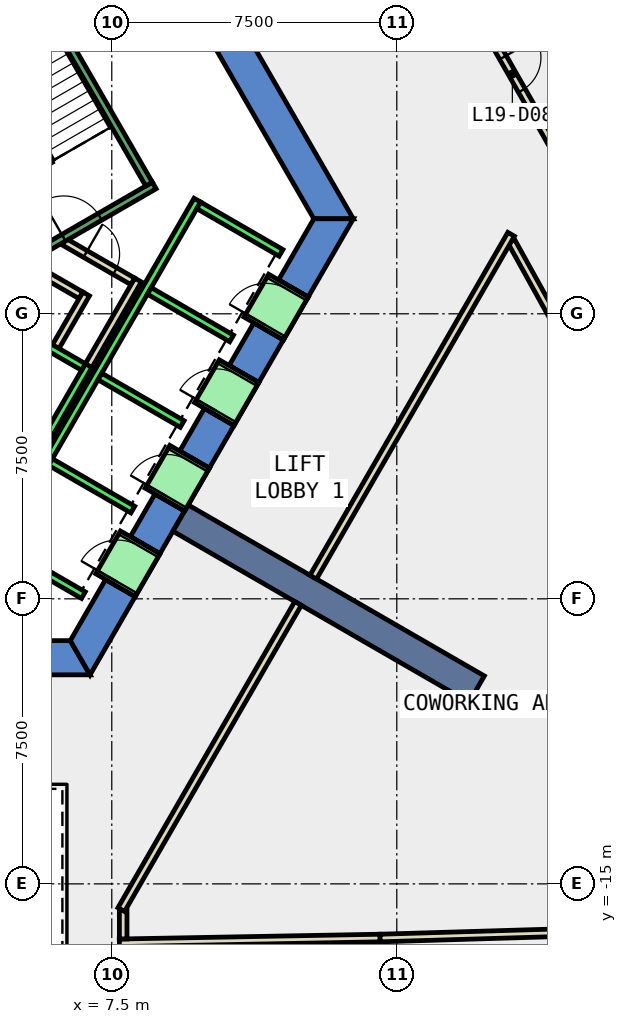
"""IFC4 building model, lengths in metres.
Left out: names, types, materials, properties, quantities, classifications, styles, units other than length and angle.
Written with IfcOpenShell. Run it as: python <this file> out.ifc"""

import sys

from ifc_helpers import new_model, si_unit, direction, frame, frame_2d, origin, place, context, subcontext, project, spatial, polyline, rectangle, outline, extrude, element, fill, save


model = new_model("IFC4")
c1 = context("Model", 3, precision=1e-05, world=origin(), true_north=direction((0.0, 1.0)))
c2 = subcontext(c1, "Body", "Model", "MODEL_VIEW")
j1 = project(units=[si_unit("LENGTHUNIT", "METRE"), si_unit("PLANEANGLEUNIT", "RADIAN")], contexts=[c1])
p1 = place(None, origin())
s1 = spatial("IfcSite", under=j1, at=p1, CompositionType="ELEMENT")
p2 = place(p1, origin())
s2 = spatial("IfcBuilding", under=s1, at=p2, CompositionType="ELEMENT")
p3 = place(p2, frame((0.0, 0.0, 90.8)))
s3 = spatial("IfcBuildingStorey", under=s2, at=p3, CompositionType="ELEMENT", Elevation=90.8)
p4 = place(p3, frame((0.0, 0.0, -0.4)))
e1 = element("IfcWall", 1, at=p4, inside=s3, PredefinedType="SHEAR", context=c2, shape_type="SweptSolid", body=[
    extrude(outline(polyline([(8.517, 11.748), (7.738, 11.298), (12.817, 2.5), (13.856, 2.5), (8.517, 11.748)])), origin(), (0.0, 0.0, 1.0), 4.2),
])
p5 = place(p3, frame((0.0, 0.0, -0.4)))
e2 = element("IfcWall", 2, at=p5, inside=s3, PredefinedType="SHEAR", context=c2, shape_type="SweptSolid", body=[
    extrude(outline(polyline([(5.75, -8.6), (5.75, -9.5), (6.928, -9.5), (6.409, -8.6), (5.75, -8.6)])), origin(), (0.0, 0.0, 1.0), 4.2),
])
p6 = place(p3, frame((0.0, 0.0, -0.4)))
e3 = element("IfcWall", 3, at=p6, inside=s3, PredefinedType="SHEAR", context=c2, shape_type="SweptSolid", body=[
    extrude(outline(polyline([(8.117, -7.44), (7.338, -6.99), (6.409, -8.6), (6.928, -9.5), (8.117, -7.44)])), origin(), (0.0, 0.0, 1.0), 4.2),
])
p7 = place(p3, frame((0.0, 0.0, -0.4)))
e4 = element("IfcWall", 4, at=p7, inside=s3, PredefinedType="SHEAR", context=c2, shape_type="SweptSolid", body=[
    extrude(outline(polyline([(9.417, -5.189), (8.638, -4.739), (7.988, -5.864), (8.767, -6.314), (9.417, -5.189)])), origin(), (0.0, 0.0, 1.0), 4.2),
])
p8 = place(p3, frame((0.0, 0.0, -0.4)))
e5 = element("IfcWall", 5, at=p8, inside=s3, PredefinedType="SHEAR", context=c2, shape_type="SweptSolid", body=[
    extrude(outline(polyline([(10.717, -2.937), (9.938, -2.487), (9.288, -3.613), (10.067, -4.063), (10.717, -2.937)])), origin(), (0.0, 0.0, 1.0), 4.2),
])
p9 = place(p3, frame((0.0, 0.0, -0.4)))
e6 = element("IfcWall", 6, at=p9, inside=s3, PredefinedType="SHEAR", context=c2, shape_type="SweptSolid", body=[
    extrude(outline(polyline([(12.017, -0.686), (11.238, -0.236), (10.588, -1.361), (11.367, -1.811), (12.017, -0.686)])), origin(), (0.0, 0.0, 1.0), 4.2),
])
p10 = place(p3, frame((0.0, 0.0, -0.4)))
e7 = element("IfcWall", 7, at=p10, inside=s3, PredefinedType="SHEAR", context=c2, shape_type="SweptSolid", body=[
    extrude(outline(polyline([(11.888, 0.89), (12.667, 0.44), (13.856, 2.5), (12.817, 2.5), (11.888, 0.89)])), origin(), (0.0, 0.0, 1.0), 4.2),
])
p11 = place(p3, frame((0.0, 0.0, 3.6)))
e8 = element("IfcWall", 8, at=p11, inside=s3, PredefinedType="SHEAR", context=c2, shape_type="SweptSolid", body=[
    extrude(outline(polyline([(8.767, -6.314), (7.988, -5.864), (7.338, -6.99), (8.117, -7.44), (8.767, -6.314)])), origin(), (0.0, 0.0, 1.0), 0.2),
])
p12 = place(p3, frame((0.0, 0.0, 3.6)))
e9 = element("IfcWall", 9, at=p12, inside=s3, PredefinedType="SHEAR", context=c2, shape_type="SweptSolid", body=[
    extrude(outline(polyline([(10.067, -4.063), (9.288, -3.613), (8.638, -4.739), (9.417, -5.189), (10.067, -4.063)])), origin(), (0.0, 0.0, 1.0), 0.2),
])
p13 = place(p3, frame((0.0, 0.0, 3.6)))
e10 = element("IfcWall", 10, at=p13, inside=s3, PredefinedType="SHEAR", context=c2, shape_type="SweptSolid", body=[
    extrude(outline(polyline([(11.367, -1.811), (10.588, -1.361), (9.938, -2.487), (10.717, -2.937), (11.367, -1.811)])), origin(), (0.0, 0.0, 1.0), 0.2),
])
p14 = place(p3, frame((0.0, 0.0, 3.6)))
e11 = element("IfcWall", 11, at=p14, inside=s3, PredefinedType="SHEAR", context=c2, shape_type="SweptSolid", body=[
    extrude(outline(polyline([(12.667, 0.44), (11.888, 0.89), (11.238, -0.236), (12.017, -0.686), (12.667, 0.44)])), origin(), (0.0, 0.0, 1.0), 0.2),
])
p15 = place(p3, frame((9.31, -5.375, -0.4), z_axis=(0.0, 0.0, 1.0), x_axis=(0.866017533419, -0.500013631625, 0.0)))
e12 = element("IfcWall", 12, at=p15, inside=s3, PredefinedType="SHEAR", context=c2, shape_type="SweptSolid", body=[
    extrude(rectangle(XDim=9.0, YDim=0.8, at=frame_2d((4.5, 0.0))), origin(), (0.0, 0.0, 1.0), 4.2),
])
p16 = place(p3, frame((7.7, -16.551, 0.0), z_axis=(0.0, 0.0, 1.0), x_axis=(0.999831478914, 0.018357934851, 0.0)))
e13 = element("IfcWall", 13, at=p16, inside=s3, PredefinedType="PARTITIONING", context=c2, shape_type="SweptSolid", body=[
    extrude(rectangle(XDim=6.862, YDim=0.2, at=frame_2d((3.431, 0.0))), origin(), (0.0, 0.0, 1.0), 3.8),
])
p17 = place(p3, frame((14.561, -16.425, 0.0), z_axis=(0.0, 0.0, 1.0), x_axis=(0.99955668677, 0.029772973188, 0.0)))
e14 = element("IfcWall", 14, at=p17, inside=s3, PredefinedType="PARTITIONING", context=c2, shape_type="SweptSolid", body=[
    extrude(rectangle(XDim=6.888, YDim=0.2, at=frame_2d((3.444, 0.0))), origin(), (0.0, 0.0, 1.0), 3.8),
])
p18 = place(p3, frame((21.317, -4.053, 0.0), z_axis=(0.0, 0.0, 1.0), x_axis=(-0.484816829319, 0.874615711046, 0.0)))
e15 = element("IfcWall", 15, at=p18, inside=s3, PredefinedType="PARTITIONING", context=c2, shape_type="SweptSolid", body=[
    extrude(rectangle(XDim=6.827, YDim=0.2, at=frame_2d((3.414, 0.0))), origin(), (0.0, 0.0, 1.0), 3.8),
])
p19 = place(p3, frame((16.243, 9.465, 0.0), z_axis=(0.0, 0.0, 1.0), x_axis=(0.495081262009, -0.868846674625, 0.0)))
e16 = element("IfcWall", 16, at=p19, inside=s3, PredefinedType="PARTITIONING", context=c2, shape_type="SweptSolid", body=[
    extrude(rectangle(XDim=7.112, YDim=0.2, at=frame_2d((3.556, 0.0))), origin(), (0.0, 0.0, 1.0), 3.8),
])
p20 = place(p19, frame((3.131, 0.0, 0.0)))
e17 = element("IfcOpeningElement", 17, at=p20, cuts=e16, PredefinedType="OPENING", context=c2, shape_type="SweptSolid", body=[
    extrude(rectangle(XDim=1.0, YDim=2.1, at=frame_2d((0.5, 1.05))), frame((0.0, 0.11, 0.0), z_axis=(0.0, -1.0, 0.0), x_axis=(1.0, 0.0, 0.0)), (0.0, 0.0, 1.0), 0.22),
])
p21 = place(p3, frame((5.499, 1.172, 0.0), z_axis=(0.0, 0.0, 1.0), x_axis=(0.866333505267, -0.499465972466, 0.0)))
e18 = element("IfcWall", 18, at=p21, inside=s3, PredefinedType="PARTITIONING", context=c2, shape_type="SweptSolid", body=[
    extrude(rectangle(XDim=1.374, YDim=0.2, at=frame_2d((0.687, 0.0))), origin(), (0.0, 0.0, 1.0), 3.8),
])
p22 = place(p3, frame((6.826, 0.522, 0.0), z_axis=(0.0, 0.0, 1.0), x_axis=(-0.500016722714, -0.866015748706, 0.0)))
e19 = element("IfcWall", 19, at=p22, inside=s3, PredefinedType="PARTITIONING", context=c2, shape_type="SweptSolid", body=[
    extrude(rectangle(XDim=1.7, YDim=0.2, at=frame_2d((0.85, 0.0))), origin(), (0.0, 0.0, 1.0), 3.8),
])
p23 = place(p3, frame((6.25, 1.894, 0.0), z_axis=(0.0, 0.0, 1.0), x_axis=(0.866043184279, -0.499969202016, 0.0)))
e20 = element("IfcWall", 20, at=p23, inside=s3, PredefinedType="PARTITIONING", context=c2, shape_type="SweptSolid", body=[
    extrude(rectangle(XDim=2.084, YDim=0.2, at=frame_2d((1.042, 0.0))), origin(), (0.0, 0.0, 1.0), 3.8),
])
p24 = place(p23, frame((0.642, 0.0, 0.0)))
e21 = element("IfcOpeningElement", 21, at=p24, cuts=e20, PredefinedType="OPENING", context=c2, shape_type="SweptSolid", body=[
    extrude(rectangle(XDim=0.9, YDim=2.1, at=frame_2d((0.45, 1.05))), frame((0.0, 0.11, 0.0), z_axis=(0.0, -1.0, 0.0), x_axis=(1.0, 0.0, 0.0)), (0.0, 0.0, 1.0), 0.22),
])
p25 = place(p3, frame((8.192, 0.888, 0.0), z_axis=(0.0, 0.0, 1.0), x_axis=(-0.499940625693, -0.866059680843, 0.0)))
e22 = element("IfcWall", 22, at=p25, inside=s3, PredefinedType="PARTITIONING", context=c2, shape_type="SweptSolid", body=[
    extrude(rectangle(XDim=2.68, YDim=0.2, at=frame_2d((1.34, 0.0))), origin(), (0.0, 0.0, 1.0), 3.8),
])
p26 = place(p3, frame((7.8, -15.69, 0.0), z_axis=(0.0, 0.0, 1.0), x_axis=(0.0, -1.0, 0.0)))
e23 = element("IfcWall", 23, at=p26, inside=s3, PredefinedType="PARTITIONING", context=c2, shape_type="SweptSolid", body=[
    extrude(rectangle(XDim=0.759, YDim=0.2, at=frame_2d((0.379, 0.0))), origin(), (0.0, 0.0, 1.0), 3.8),
])
p27 = place(p3, frame((18.009, 2.092, 0.0), z_axis=(0.0, 0.0, 1.0), x_axis=(-0.499980796252, -0.866036490789, 0.0)))
e24 = element("IfcWall", 24, at=p27, inside=s3, PredefinedType="PARTITIONING", context=c2, shape_type="SweptSolid", body=[
    extrude(rectangle(XDim=10.417, YDim=0.2, at=frame_2d((5.208, 0.0))), origin(), (0.0, 0.0, 1.0), 3.8),
])
p28 = place(p3, frame((12.401, -7.621, 0.0), z_axis=(0.0, 0.0, 1.0), x_axis=(-0.499983724212, -0.866034800411, 0.0)))
e25 = element("IfcWall", 25, at=p28, inside=s3, PredefinedType="PARTITIONING", context=c2, shape_type="SweptSolid", body=[
    extrude(rectangle(XDim=9.302, YDim=0.2, at=frame_2d((4.651, 0.0))), origin(), (0.0, 0.0, 1.0), 3.8),
])
p29 = place(p3, frame((5.492, -3.788, 0.0), z_axis=(0.0, 0.0, 1.0), x_axis=(0.500011755427, 0.866018616679, 0.0)))
e26 = element("IfcWall", 26, at=p29, inside=s3, PredefinedType="STANDARD", context=c2, shape_type="SweptSolid", body=[
    extrude(rectangle(XDim=2.8, YDim=0.2, at=frame_2d((1.4, 0.0))), origin(), (0.0, 0.0, 1.0), 3.8),
])
p30 = place(p3, frame((4.677, -0.2, 0.0), z_axis=(0.0, 0.0, 1.0), x_axis=(0.865973769406, -0.500089422704, 0.0)))
e27 = element("IfcWall", 27, at=p30, inside=s3, PredefinedType="STANDARD", context=c2, shape_type="SweptSolid", body=[
    extrude(rectangle(XDim=2.399, YDim=0.2, at=frame_2d((1.2, 0.0))), origin(), (0.0, 0.0, 1.0), 3.8),
])
p31 = place(p3, frame((4.451, -6.19, 0.0), z_axis=(0.0, 0.0, 1.0), x_axis=(0.50000090737, 0.866024879913, 0.0)))
e28 = element("IfcWall", 28, at=p31, inside=s3, PredefinedType="STANDARD", context=c2, shape_type="SweptSolid", body=[
    extrude(rectangle(XDim=10.6, YDim=0.2, at=frame_2d((5.3, 0.0))), origin(), (0.0, 0.0, 1.0), 3.8),
])
for number, where, z_axis, x_axis in (
    (29, (4.588, -6.153, 0.0), (0.0, 0.0, 1.0), (0.866, -0.5, 0.0)),
    (30, (5.888, -3.902, 0.0), (0.0, 0.0, 1.0), (0.866, -0.5, 0.0)),
    (31, (7.188, -1.65, 0.0), (0.0, 0.0, 1.0), (0.866, -0.5, 0.0)),
    (32, (8.488, 0.602, 0.0), (0.0, 0.0, 1.0), (0.866, -0.5, 0.0)),
):
    element("IfcWall", number, at=place(p3, frame(where, z_axis=z_axis, x_axis=x_axis)), inside=s3, PredefinedType="STANDARD", context=c2, shape_type="SweptSolid", body=[
        extrude(rectangle(XDim=2.5, YDim=0.2, at=frame_2d((1.25, 0.0))), origin(), (0.0, 0.0, 1.0), 3.8),
    ])
p32 = place(p3, frame((9.788, 2.853, 0.0), z_axis=(0.0, 0.0, 1.0), x_axis=(0.865998541277, -0.500046524342, 0.0)))
e33 = element("IfcWall", 33, at=p32, inside=s3, PredefinedType="STANDARD", context=c2, shape_type="SweptSolid", body=[
    extrude(rectangle(XDim=2.5, YDim=0.2, at=frame_2d((1.25, 0.0))), origin(), (0.0, 0.0, 1.0), 3.8),
])
p33 = place(p3, frame((7.598, -7.14, 0.0), z_axis=(0.0, 0.0, 1.0), x_axis=(0.500362116554, 0.865816234728, 0.0)))
e34 = element("IfcWall", 34, at=p33, inside=s3, PredefinedType="STANDARD", context=c2, shape_type="SweptSolid", body=[
    extrude(rectangle(XDim=1.299, YDim=1.2, at=frame_2d((0.65, 0.0))), origin(), (0.0, 0.0, 1.0), 2.4),
])
p34 = place(p33, frame((0.1, 0.0, 0.0)))
e35 = element("IfcOpeningElement", 35, at=p34, cuts=e34, PredefinedType="OPENING", context=c2, shape_type="SweptSolid", body=[
    extrude(rectangle(XDim=1.1, YDim=2.3, at=frame_2d((0.55, 1.15))), frame((0.0, 0.61, 0.0), z_axis=(0.0, -1.0, 0.0), x_axis=(1.0, 0.0, 0.0)), (0.0, 0.0, 1.0), 1.22),
])
p35 = place(p3, frame((8.898, -4.889, 0.0), z_axis=(0.0, 0.0, 1.0), x_axis=(0.500036693733, 0.866004217611, 0.0)))
e36 = element("IfcWall", 36, at=p35, inside=s3, PredefinedType="STANDARD", context=c2, shape_type="SweptSolid", body=[
    extrude(rectangle(XDim=1.3, YDim=1.2, at=frame_2d((0.65, 0.0))), origin(), (0.0, 0.0, 1.0), 2.4),
])
p36 = place(p35, frame((0.1, 0.0, 0.0)))
e37 = element("IfcOpeningElement", 37, at=p36, cuts=e36, PredefinedType="OPENING", context=c2, shape_type="SweptSolid", body=[
    extrude(rectangle(XDim=1.1, YDim=2.3, at=frame_2d((0.55, 1.15))), frame((0.0, 0.61, 0.0), z_axis=(0.0, -1.0, 0.0), x_axis=(1.0, 0.0, 0.0)), (0.0, 0.0, 1.0), 1.22),
])
p37 = place(p3, frame((10.198, -2.637, 0.0), z_axis=(0.0, 0.0, 1.0), x_axis=(0.49989585183, 0.866085525409, 0.0)))
e38 = element("IfcWall", 38, at=p37, inside=s3, PredefinedType="STANDARD", context=c2, shape_type="SweptSolid", body=[
    extrude(rectangle(XDim=1.3, YDim=1.2, at=frame_2d((0.65, 0.0))), origin(), (0.0, 0.0, 1.0), 2.4),
])
p38 = place(p37, frame((0.1, 0.0, 0.0)))
e39 = element("IfcOpeningElement", 39, at=p38, cuts=e38, PredefinedType="OPENING", context=c2, shape_type="SweptSolid", body=[
    extrude(rectangle(XDim=1.1, YDim=2.3, at=frame_2d((0.55, 1.15))), frame((0.0, 0.61, 0.0), z_axis=(0.0, -1.0, 0.0), x_axis=(1.0, 0.0, 0.0)), (0.0, 0.0, 1.0), 1.22),
])
p39 = place(p3, frame((11.498, -0.385, 0.0), z_axis=(0.0, 0.0, 1.0), x_axis=(0.500221244143, 0.865897630733, 0.0)))
e40 = element("IfcWall", 40, at=p39, inside=s3, PredefinedType="STANDARD", context=c2, shape_type="SweptSolid", body=[
    extrude(rectangle(XDim=1.299, YDim=1.2, at=frame_2d((0.65, 0.0))), origin(), (0.0, 0.0, 1.0), 2.4),
])
p40 = place(p39, frame((0.1, 0.0, 0.0)))
e41 = element("IfcOpeningElement", 41, at=p40, cuts=e40, PredefinedType="OPENING", context=c2, shape_type="SweptSolid", body=[
    extrude(rectangle(XDim=1.1, YDim=2.3, at=frame_2d((0.55, 1.15))), frame((0.0, 0.61, 0.0), z_axis=(0.0, -1.0, 0.0), x_axis=(1.0, 0.0, 0.0)), (0.0, 0.0, 1.0), 1.22),
])
p41 = place(p3, frame((4.806, 1.176, 0.0), z_axis=(0.0, 0.0, 1.0), x_axis=(0.866059941101, 0.499940174841, 0.0)))
e42 = element("IfcWall", 42, at=p41, inside=s3, PredefinedType="STANDARD", context=c2, shape_type="SweptSolid", body=[
    extrude(rectangle(XDim=4.4, YDim=0.2, at=frame_2d((2.2, 0.0))), origin(), (0.0, 0.0, 1.0), 3.8),
])
p42 = place(p41, frame((1.65, 0.0, 0.0)))
e43 = element("IfcOpeningElement", 43, at=p42, cuts=e42, PredefinedType="OPENING", context=c2, shape_type="SweptSolid", body=[
    extrude(rectangle(XDim=1.1, YDim=2.2, at=frame_2d((0.55, 1.1))), frame((0.0, 0.11, 0.0), z_axis=(0.0, -1.0, 0.0), x_axis=(1.0, 0.0, 0.0)), (0.0, 0.0, 1.0), 0.22),
])
p43 = place(p3, frame((8.48, 3.412, 0.0), z_axis=(0.0, 0.0, 1.0), x_axis=(-0.499978703459, 0.866037698999, 0.0)))
e44 = element("IfcWall", 44, at=p43, inside=s3, PredefinedType="STANDARD", context=c2, shape_type="SweptSolid", body=[
    extrude(rectangle(XDim=6.9, YDim=0.2, at=frame_2d((3.45, 0.0))), origin(), (0.0, 0.0, 1.0), 3.8),
])
p44 = place(p20, origin())
e45 = element("IfcDoor", 45, at=p44, inside=s3, OperationType="SINGLE_SWING_LEFT", PredefinedType="DOOR", context=c2, shape_type="SweptSolid", body=[
    extrude(rectangle(XDim=1.0, YDim=2.1, at=frame_2d((0.5, 1.05))), frame((0.0, 0.025, 0.0), z_axis=(0.0, -1.0, 0.0), x_axis=(1.0, 0.0, 0.0)), (0.0, 0.0, 1.0), 0.05),
])
fill(e17, e45)
p45 = place(p24, origin())
e46 = element("IfcDoor", 46, at=p45, inside=s3, OperationType="SINGLE_SWING_LEFT", PredefinedType="DOOR", context=c2, shape_type="SweptSolid", body=[
    extrude(rectangle(XDim=0.9, YDim=2.1, at=frame_2d((0.45, 1.05))), frame((0.0, 0.025, 0.0), z_axis=(0.0, -1.0, 0.0), x_axis=(1.0, 0.0, 0.0)), (0.0, 0.0, 1.0), 0.05),
])
fill(e21, e46)
p46 = place(p34, origin())
e47 = element("IfcDoor", 47, at=p46, inside=s3, OperationType="SLIDING_TO_LEFT", PredefinedType="DOOR", context=c2, shape_type="SweptSolid", body=[
    extrude(rectangle(XDim=1.1, YDim=2.3, at=frame_2d((0.55, 1.15))), frame((0.0, 0.025, 0.0), z_axis=(0.0, -1.0, 0.0), x_axis=(1.0, 0.0, 0.0)), (0.0, 0.0, 1.0), 0.05),
])
fill(e35, e47)
p47 = place(p36, origin())
e48 = element("IfcDoor", 48, at=p47, inside=s3, OperationType="SLIDING_TO_LEFT", PredefinedType="DOOR", context=c2, shape_type="SweptSolid", body=[
    extrude(rectangle(XDim=1.1, YDim=2.3, at=frame_2d((0.55, 1.15))), frame((0.0, 0.025, 0.0), z_axis=(0.0, -1.0, 0.0), x_axis=(1.0, 0.0, 0.0)), (0.0, 0.0, 1.0), 0.05),
])
fill(e37, e48)
p48 = place(p38, origin())
e49 = element("IfcDoor", 49, at=p48, inside=s3, OperationType="SLIDING_TO_LEFT", PredefinedType="DOOR", context=c2, shape_type="SweptSolid", body=[
    extrude(rectangle(XDim=1.1, YDim=2.3, at=frame_2d((0.55, 1.15))), frame((0.0, 0.025, 0.0), z_axis=(0.0, -1.0, 0.0), x_axis=(1.0, 0.0, 0.0)), (0.0, 0.0, 1.0), 0.05),
])
fill(e39, e49)
p49 = place(p40, origin())
e50 = element("IfcDoor", 50, at=p49, inside=s3, OperationType="SLIDING_TO_LEFT", PredefinedType="DOOR", context=c2, shape_type="SweptSolid", body=[
    extrude(rectangle(XDim=1.1, YDim=2.3, at=frame_2d((0.55, 1.15))), frame((0.0, 0.025, 0.0), z_axis=(0.0, -1.0, 0.0), x_axis=(1.0, 0.0, 0.0)), (0.0, 0.0, 1.0), 0.05),
])
fill(e41, e50)
p50 = place(p42, origin())
e51 = element("IfcDoor", 51, at=p50, inside=s3, OperationType="SINGLE_SWING_LEFT", PredefinedType="DOOR", context=c2, shape_type="SweptSolid", body=[
    extrude(rectangle(XDim=1.1, YDim=2.2, at=frame_2d((0.55, 1.1))), frame((0.0, 0.025, 0.0), z_axis=(0.0, -1.0, 0.0), x_axis=(1.0, 0.0, 0.0)), (0.0, 0.0, 1.0), 0.05),
])
fill(e43, e51)
save(model, sys.argv[1])
